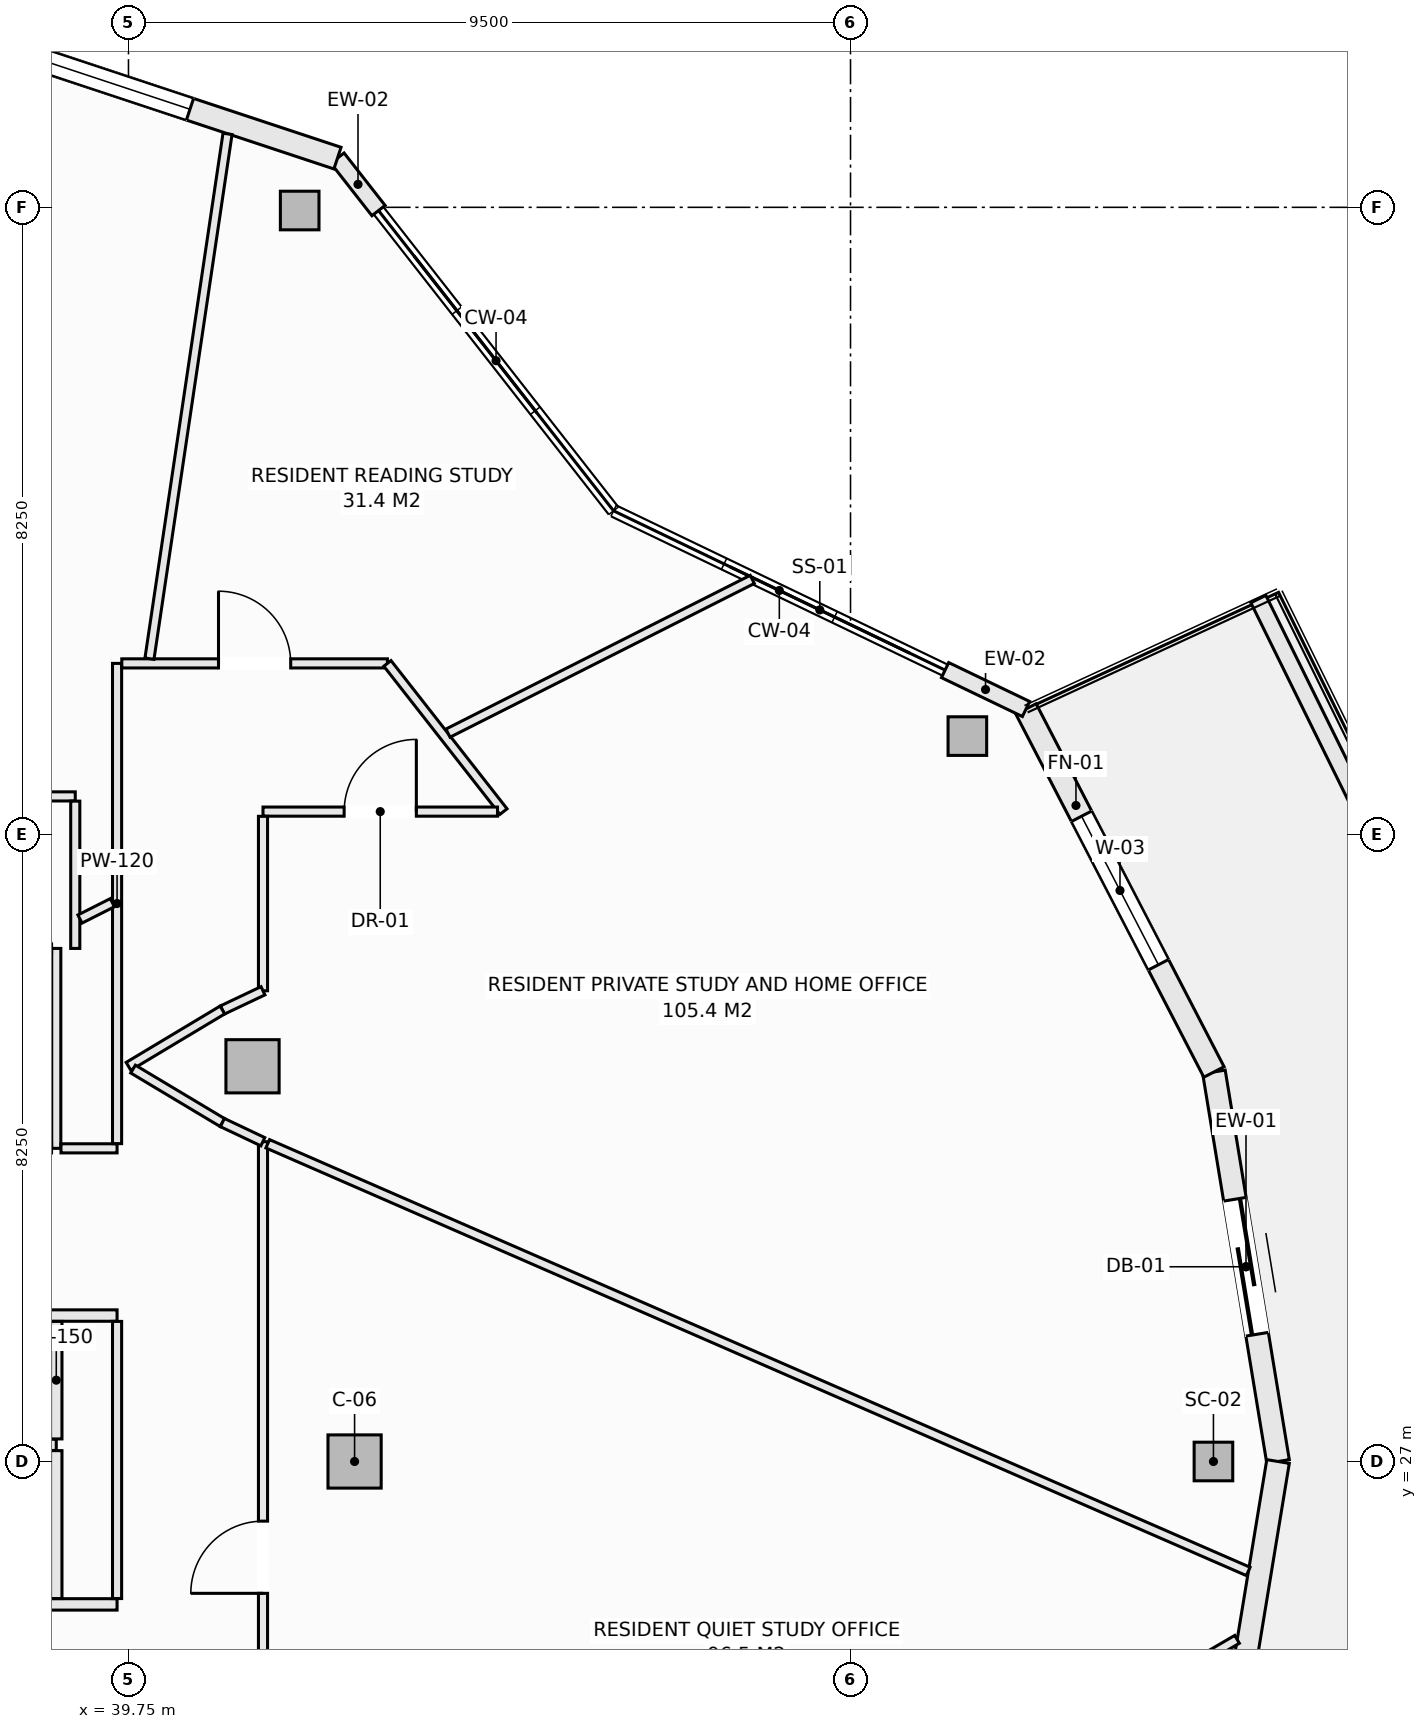
"""IFC4 building model, lengths in metres.
Left out: names, types, materials, properties, quantities, classifications, styles, units other than length and angle.
Written with IfcOpenShell. Run it as: python <this file> out.ifc"""

import sys

from ifc_helpers import new_model, si_unit, direction, frame, frame_2d, origin, origin_2d, place, context, subcontext, project, spatial, rectangle, hollow_rectangle, extrude, element, fill, save


model = new_model("IFC4")
c1 = context("Model", 3, precision=1e-05, world=origin(), true_north=direction((0.0, 1.0)))
c2 = subcontext(c1, "Body", "Model", "MODEL_VIEW")
j1 = project(units=[si_unit("LENGTHUNIT", "METRE"), si_unit("PLANEANGLEUNIT", "RADIAN")], contexts=[c1])
p1 = place(None, origin())
s1 = spatial("IfcSite", under=j1, at=p1, CompositionType="ELEMENT")
p2 = place(p1, origin())
s2 = spatial("IfcBuilding", under=s1, at=p2, CompositionType="ELEMENT")
p3 = place(p2, frame((0.0, 0.0, 232.7)))
s3 = spatial("IfcBuildingStorey", under=s2, at=p3, CompositionType="ELEMENT", Elevation=232.7)
for number, where, z_axis, x_axis in (
    (1, (54.025, 27.0, -0.27), (0.0, 0.0, 1.0), (1.0, 0.0, 0.0)),
    (2, (50.787, 36.544, -0.27), (0.0, 0.0, 1.0), (1.0, 0.0, 0.0)),
    (3, (42.003, 43.458, -0.27), (0.0, 0.0, 1.0), (1.0, 0.0, 0.0)),
):
    element("IfcColumn", number, at=place(p3, frame(where, z_axis=z_axis, x_axis=x_axis)), inside=s3, PredefinedType="COLUMN", context=c2, shape_type="SweptSolid", body=[
        extrude(hollow_rectangle(XDim=0.508, YDim=0.508, WallThickness=0.019, at=origin_2d()), origin(), (0.0, 0.0, 1.0), 3.3),
    ])
for number, where, z_axis, x_axis in (
    (4, (42.725, 27.0, -0.27), (0.0, 0.0, 1.0), (1.0, 0.0, 0.0)),
    (5, (41.382, 32.199, -0.27), (0.0, 0.0, 1.0), (1.0, 0.0, 0.0)),
):
    element("IfcColumn", number, at=place(p3, frame(where, z_axis=z_axis, x_axis=x_axis)), inside=s3, PredefinedType="COLUMN", context=c2, shape_type="SweptSolid", body=[
        extrude(rectangle(XDim=0.7, YDim=0.7, at=origin_2d()), origin(), (0.0, 0.0, 1.0), 3.3),
    ])
p4 = place(p3, frame((54.032, 32.125, 0.0), z_axis=(0.0, 0.0, 1.0), x_axis=(0.16237087798, -0.986729799886, 0.0)))
e6 = element("IfcWall", 6, at=p4, inside=s3, PredefinedType="SOLIDWALL", context=c2, shape_type="SweptSolid", body=[
    extrude(rectangle(XDim=5.193, YDim=0.3, at=frame_2d((2.597, 0.0))), origin(), (0.0, 0.0, 1.0), 2.605),
])
p5 = place(p4, frame((1.697, 0.0, 0.0)))
e7 = element("IfcOpeningElement", 7, at=p5, cuts=e6, PredefinedType="OPENING", context=c2, shape_type="SweptSolid", body=[
    extrude(rectangle(XDim=1.8, YDim=2.25, at=frame_2d((0.9, 1.125))), frame((0.0, 0.16, 0.0), z_axis=(0.0, -1.0, 0.0), x_axis=(1.0, 0.0, 0.0)), (0.0, 0.0, 1.0), 0.32),
])
p6 = place(p3, frame((51.559, 36.9, 0.0), z_axis=(0.0, 0.0, 1.0), x_axis=(0.459808219482, -0.888018243786, 0.0)))
e8 = element("IfcWall", 8, at=p6, inside=s3, PredefinedType="SOLIDWALL", context=c2, shape_type="SweptSolid", body=[
    extrude(rectangle(XDim=5.378, YDim=0.3, at=frame_2d((2.689, 0.0))), origin(), (0.0, 0.0, 1.0), 2.605),
])
p7 = place(p6, frame((1.589, 0.0, 0.72)))
e9 = element("IfcOpeningElement", 9, at=p7, cuts=e8, PredefinedType="OPENING", context=c2, shape_type="SweptSolid", body=[
    extrude(rectangle(XDim=2.2, YDim=1.65, at=frame_2d((1.1, 0.825))), frame((0.0, 0.16, 0.0), z_axis=(0.0, -1.0, 0.0), x_axis=(1.0, 0.0, 0.0)), (0.0, 0.0, 1.0), 0.32),
])
p8 = place(p3, frame((50.494, 37.412, 0.0), z_axis=(0.0, 0.0, 1.0), x_axis=(0.901342408365, -0.433107218692, 0.0)))
e10 = element("IfcWall", 10, at=p8, inside=s3, PredefinedType="SOLIDWALL", context=c2, shape_type="SweptSolid", body=[
    extrude(rectangle(XDim=1.181, YDim=0.22, at=frame_2d((0.591, 0.0))), origin(), (0.0, 0.0, 1.0), 2.605),
])
p9 = place(p3, frame((42.5, 44.147, 0.0), z_axis=(0.0, 0.0, 1.0), x_axis=(0.61650363284, -0.787352062736, 0.0)))
e11 = element("IfcWall", 11, at=p9, inside=s3, PredefinedType="SOLIDWALL", context=c2, shape_type="SweptSolid", body=[
    extrude(rectangle(XDim=0.876, YDim=0.22, at=frame_2d((0.438, 0.0))), origin(), (0.0, 0.0, 1.0), 2.605),
])
p10 = place(p3, frame((36.531, 46.125, 0.0), z_axis=(0.0, 0.0, 1.0), x_axis=(0.949240877604, -0.314550085495, 0.0)))
e12 = element("IfcWall", 12, at=p10, inside=s3, PredefinedType="SOLIDWALL", context=c2, shape_type="SweptSolid", body=[
    extrude(rectangle(XDim=6.288, YDim=0.3, at=frame_2d((3.144, 0.0))), origin(), (0.0, 0.0, 1.0), 2.605),
])
p11 = place(p10, frame((2.044, 0.0, 0.72)))
e13 = element("IfcOpeningElement", 13, at=p11, cuts=e12, PredefinedType="OPENING", context=c2, shape_type="SweptSolid", body=[
    extrude(rectangle(XDim=2.2, YDim=1.65, at=frame_2d((1.1, 0.825))), frame((0.0, 0.16, 0.0), z_axis=(0.0, -1.0, 0.0), x_axis=(1.0, 0.0, 0.0)), (0.0, 0.0, 1.0), 0.32),
])
p12 = place(p3, frame((54.032, 21.875, 0.0), z_axis=(0.0, 0.0, 1.0), x_axis=(0.16237087798, 0.986729799886, 0.0)))
e14 = element("IfcWall", 14, at=p12, inside=s3, PredefinedType="SOLIDWALL", context=c2, shape_type="SweptSolid", body=[
    extrude(rectangle(XDim=5.193, YDim=0.3, at=frame_2d((2.597, 0.0))), origin(), (0.0, 0.0, 1.0), 2.605),
])
p13 = place(p12, frame((1.18, 0.0, 0.72)))
e15 = element("IfcOpeningElement", 15, at=p13, cuts=e14, PredefinedType="OPENING", context=c2, shape_type="SweptSolid", body=[
    extrude(rectangle(XDim=1.2, YDim=1.65, at=frame_2d((0.6, 0.825))), frame((0.0, 0.16, 0.0), z_axis=(0.0, -1.0, 0.0), x_axis=(1.0, 0.0, 0.0)), (0.0, 0.0, 1.0), 0.32),
])
p14 = place(p3, frame((54.616, 38.347, 0.0), z_axis=(0.0, 0.0, 1.0), x_axis=(0.441640961804, -0.897191875162, 0.0)))
e16 = element("IfcWall", 16, at=p14, inside=s3, PredefinedType="PARAPET", context=c2, shape_type="SweptSolid", body=[
    extrude(rectangle(XDim=6.178, YDim=0.22, at=frame_2d((3.089, 0.0))), origin(), (0.0, 0.0, 1.0), 0.52),
])
p15 = place(p3, frame((30.077, 28.92, 0.0), z_axis=(0.0, 0.0, 1.0), x_axis=(1.0, 0.0, 0.0)))
e17 = element("IfcWall", 17, at=p15, inside=s3, PredefinedType="PARTITIONING", context=c2, shape_type="SweptSolid", body=[
    extrude(rectangle(XDim=9.523, YDim=0.15, at=frame_2d((4.762, 0.0))), origin(), (0.0, 0.0, 1.0), 3.03),
])
p16 = place(p15, frame((1.342, 0.0, 0.0)))
e18 = element("IfcOpeningElement", 18, at=p16, cuts=e17, PredefinedType="OPENING", context=c2, shape_type="SweptSolid", body=[
    extrude(rectangle(XDim=0.95, YDim=2.1, at=frame_2d((0.475, 1.05))), frame((0.0, 0.085, 0.0), z_axis=(0.0, -1.0, 0.0), x_axis=(1.0, 0.0, 0.0)), (0.0, 0.0, 1.0), 0.17),
])
p17 = place(p15, frame((5.498, 0.0, 0.0)))
e19 = element("IfcOpeningElement", 19, at=p17, cuts=e17, PredefinedType="OPENING", context=c2, shape_type="SweptSolid", body=[
    extrude(rectangle(XDim=0.95, YDim=2.1, at=frame_2d((0.475, 1.05))), frame((0.0, 0.085, 0.0), z_axis=(0.0, -1.0, 0.0), x_axis=(1.0, 0.0, 0.0)), (0.0, 0.0, 1.0), 0.17),
])
p18 = place(p3, frame((33.377, 25.12, 0.0), z_axis=(0.0, 0.0, 1.0), x_axis=(1.0, 0.0, 0.0)))
e20 = element("IfcWall", 20, at=p18, inside=s3, PredefinedType="PARTITIONING", context=c2, shape_type="SweptSolid", body=[
    extrude(rectangle(XDim=6.223, YDim=0.15, at=frame_2d((3.112, 0.0))), origin(), (0.0, 0.0, 1.0), 3.03),
])
p19 = place(p18, frame((2.441, 0.0, 0.0)))
e21 = element("IfcOpeningElement", 21, at=p19, cuts=e20, PredefinedType="OPENING", context=c2, shape_type="SweptSolid", body=[
    extrude(rectangle(XDim=0.95, YDim=2.1, at=frame_2d((0.475, 1.05))), frame((0.0, 0.085, 0.0), z_axis=(0.0, -1.0, 0.0), x_axis=(1.0, 0.0, 0.0)), (0.0, 0.0, 1.0), 0.17),
])
p20 = place(p3, frame((33.377, 27.22, 0.0), z_axis=(0.0, 0.0, 1.0), x_axis=(1.0, 0.0, 0.0)))
e22 = element("IfcWall", 22, at=p20, inside=s3, PredefinedType="PARTITIONING", context=c2, shape_type="SweptSolid", body=[
    extrude(rectangle(XDim=5.423, YDim=0.15, at=frame_2d((2.711, 0.0))), origin(), (0.0, 0.0, 1.0), 3.03),
])
p21 = place(p3, frame((38.8, 25.197, 0.0), z_axis=(0.0, 0.0, 1.0), x_axis=(0.0, 1.0, 0.0)))
e23 = element("IfcWall", 23, at=p21, inside=s3, PredefinedType="PARTITIONING", context=c2, shape_type="SweptSolid", body=[
    extrude(rectangle(XDim=1.946, YDim=0.15, at=frame_2d((0.973, 0.0))), origin(), (0.0, 0.0, 1.0), 3.03),
])
p22 = place(p3, frame((38.8, 27.297, 0.0), z_axis=(0.0, 0.0, 1.0), x_axis=(0.0, 1.0, 0.0)))
e24 = element("IfcWall", 24, at=p22, inside=s3, PredefinedType="PARTITIONING", context=c2, shape_type="SweptSolid", body=[
    extrude(rectangle(XDim=1.546, YDim=0.15, at=frame_2d((0.773, 0.0))), origin(), (0.0, 0.0, 1.0), 3.03),
])
p23 = place(p3, frame((38.8, 31.12, 0.0), z_axis=(0.0, 0.0, 1.0), x_axis=(0.0, 1.0, 0.0)))
e25 = element("IfcWall", 25, at=p23, inside=s3, PredefinedType="PARTITIONING", context=c2, shape_type="SweptSolid", body=[
    extrude(rectangle(XDim=2.63, YDim=0.12, at=frame_2d((1.315, 0.0))), origin(), (0.0, 0.0, 1.0), 3.03),
])
p24 = place(p3, frame((38.862, 31.12, 0.0), z_axis=(0.0, 0.0, 1.0), x_axis=(1.0, 0.0, 0.0)))
e26 = element("IfcWall", 26, at=p24, inside=s3, PredefinedType="PARTITIONING", context=c2, shape_type="SweptSolid", body=[
    extrude(rectangle(XDim=0.738, YDim=0.12, at=frame_2d((0.369, 0.0))), origin(), (0.0, 0.0, 1.0), 3.03),
])
p25 = place(p3, frame((34.025, 35.75, 0.0), z_axis=(0.0, 0.0, 1.0), x_axis=(1.0, 0.0, 0.0)))
e27 = element("IfcWall", 27, at=p25, inside=s3, PredefinedType="PARTITIONING", context=c2, shape_type="SweptSolid", body=[
    extrude(rectangle(XDim=5.025, YDim=0.12, at=frame_2d((2.513, 0.0))), origin(), (0.0, 0.0, 1.0), 2.478),
])
p26 = place(p25, frame((1.617, 0.0, 0.0)))
e28 = element("IfcOpeningElement", 28, at=p26, cuts=e27, PredefinedType="OPENING", context=c2, shape_type="SweptSolid", body=[
    extrude(rectangle(XDim=0.95, YDim=2.1, at=frame_2d((0.475, 1.05))), frame((0.0, 0.07, 0.0), z_axis=(0.0, -1.0, 0.0), x_axis=(1.0, 0.0, 0.0)), (0.0, 0.0, 1.0), 0.14),
])
p27 = place(p3, frame((39.05, 33.75, 0.0), z_axis=(0.0, 0.0, 1.0), x_axis=(0.0, 1.0, 0.0)))
e29 = element("IfcWall", 29, at=p27, inside=s3, PredefinedType="PARTITIONING", context=c2, shape_type="SweptSolid", body=[
    extrude(rectangle(XDim=1.938, YDim=0.12, at=frame_2d((0.969, 0.0))), origin(), (0.0, 0.0, 1.0), 3.03),
])
p28 = place(p3, frame((39.6, 25.197, 0.0), z_axis=(0.0, 0.0, 1.0), x_axis=(0.0, 1.0, 0.0)))
e30 = element("IfcWall", 30, at=p28, inside=s3, PredefinedType="PARTITIONING", context=c2, shape_type="SweptSolid", body=[
    extrude(rectangle(XDim=3.646, YDim=0.12, at=frame_2d((1.823, 0.0))), origin(), (0.0, 0.0, 1.0), 3.03),
])
p29 = place(p3, frame((39.6, 31.182, 0.0), z_axis=(0.0, 0.0, 1.0), x_axis=(0.0, 1.0, 0.0)))
e31 = element("IfcWall", 31, at=p29, inside=s3, PredefinedType="PARTITIONING", context=c2, shape_type="SweptSolid", body=[
    extrude(rectangle(XDim=6.318, YDim=0.12, at=frame_2d((3.159, 0.0))), origin(), (0.0, 0.0, 1.0), 3.03),
])
p30 = place(p3, frame((39.662, 37.5, 0.0), z_axis=(0.0, 0.0, 1.0), x_axis=(1.0, 0.0, 0.0)))
e32 = element("IfcWall", 32, at=p30, inside=s3, PredefinedType="PARTITIONING", context=c2, shape_type="SweptSolid", body=[
    extrude(rectangle(XDim=3.495, YDim=0.12, at=frame_2d((1.748, 0.0))), origin(), (0.0, 0.0, 1.0), 2.77),
])
p31 = place(p30, frame((1.272, 0.0, 0.0)))
e33 = element("IfcOpeningElement", 33, at=p31, cuts=e32, PredefinedType="OPENING", context=c2, shape_type="SweptSolid", body=[
    extrude(rectangle(XDim=0.95, YDim=2.1, at=frame_2d((0.475, 1.05))), frame((0.0, 0.07, 0.0), z_axis=(0.0, -1.0, 0.0), x_axis=(1.0, 0.0, 0.0)), (0.0, 0.0, 1.0), 0.14),
])
p32 = place(p3, frame((43.157, 37.5, 0.0), z_axis=(0.0, 0.0, 1.0), x_axis=(0.616571357052, -0.78729902938, 0.0)))
e34 = element("IfcWall", 34, at=p32, inside=s3, PredefinedType="PARTITIONING", context=c2, shape_type="SweptSolid", body=[
    extrude(rectangle(XDim=2.477, YDim=0.12, at=frame_2d((1.238, 0.0))), origin(), (0.0, 0.0, 1.0), 3.03),
])
p33 = place(p3, frame((41.52, 35.55, 0.0), z_axis=(0.0, 0.0, 1.0), x_axis=(1.0, 0.0, 0.0)))
e35 = element("IfcWall", 35, at=p33, inside=s3, PredefinedType="PARTITIONING", context=c2, shape_type="SweptSolid", body=[
    extrude(rectangle(XDim=3.085, YDim=0.12, at=frame_2d((1.542, 0.0))), origin(), (0.0, 0.0, 1.0), 3.03),
])
p34 = place(p33, frame((1.068, 0.0, 0.0)))
e36 = element("IfcOpeningElement", 36, at=p34, cuts=e35, PredefinedType="OPENING", context=c2, shape_type="SweptSolid", body=[
    extrude(rectangle(XDim=0.95, YDim=2.1, at=frame_2d((0.475, 1.05))), frame((0.0, 0.07, 0.0), z_axis=(0.0, -1.0, 0.0), x_axis=(1.0, 0.0, 0.0)), (0.0, 0.0, 1.0), 0.14),
])
p35 = place(p3, frame((41.52, 22.794, 0.0), z_axis=(0.0, 0.0, 1.0), x_axis=(0.0, 1.0, 0.0)))
e37 = element("IfcWall", 37, at=p35, inside=s3, PredefinedType="PARTITIONING", context=c2, shape_type="SweptSolid", body=[
    extrude(rectangle(XDim=8.413, YDim=0.12, at=frame_2d((4.207, 0.0))), origin(), (0.0, 0.0, 1.0), 2.478),
])
p36 = place(p35, frame((2.471, 0.0, 0.0)))
e38 = element("IfcOpeningElement", 38, at=p36, cuts=e37, PredefinedType="OPENING", context=c2, shape_type="SweptSolid", body=[
    extrude(rectangle(XDim=0.95, YDim=2.1, at=frame_2d((0.475, 1.05))), frame((0.0, 0.07, 0.0), z_axis=(0.0, -1.0, 0.0), x_axis=(1.0, 0.0, 0.0)), (0.0, 0.0, 1.0), 0.14),
])
p37 = place(p3, frame((41.52, 33.193, 0.0), z_axis=(0.0, 0.0, 1.0), x_axis=(0.0, 1.0, 0.0)))
e39 = element("IfcWall", 39, at=p37, inside=s3, PredefinedType="PARTITIONING", context=c2, shape_type="SweptSolid", body=[
    extrude(rectangle(XDim=2.295, YDim=0.12, at=frame_2d((1.147, 0.0))), origin(), (0.0, 0.0, 1.0), 3.03),
])
p38 = place(p3, frame((40.986, 32.94, 0.0), z_axis=(0.0, 0.0, 1.0), x_axis=(0.90356951601, 0.428441512621, 0.0)))
e40 = element("IfcWall", 40, at=p38, inside=s3, PredefinedType="PARTITIONING", context=c2, shape_type="SweptSolid", body=[
    extrude(rectangle(XDim=0.591, YDim=0.12, at=frame_2d((0.295, 0.0))), origin(), (0.0, 0.0, 1.0), 3.03),
])
p39 = place(p3, frame((39.75, 32.199, 0.0), z_axis=(0.0, 0.0, 1.0), x_axis=(0.857702120906, 0.514146935996, 0.0)))
e41 = element("IfcWall", 41, at=p39, inside=s3, PredefinedType="PARTITIONING", context=c2, shape_type="SweptSolid", body=[
    extrude(rectangle(XDim=1.441, YDim=0.12, at=frame_2d((0.721, 0.0))), origin(), (0.0, 0.0, 1.0), 3.03),
])
p40 = place(p3, frame((39.81, 32.163, 0.0), z_axis=(0.0, 0.0, 1.0), x_axis=(0.858011245414, -0.513630901273, 0.0)))
e42 = element("IfcWall", 42, at=p40, inside=s3, PredefinedType="PARTITIONING", context=c2, shape_type="SweptSolid", body=[
    extrude(rectangle(XDim=1.37, YDim=0.12, at=frame_2d((0.685, 0.0))), origin(), (0.0, 0.0, 1.0), 3.03),
])
p41 = place(p3, frame((40.986, 31.459, 0.0), z_axis=(0.0, 0.0, 1.0), x_axis=(0.903687141457, -0.428193356283, 0.0)))
e43 = element("IfcWall", 43, at=p41, inside=s3, PredefinedType="PARTITIONING", context=c2, shape_type="SweptSolid", body=[
    extrude(rectangle(XDim=0.588, YDim=0.12, at=frame_2d((0.294, 0.0))), origin(), (0.0, 0.0, 1.0), 3.03),
])
p42 = place(p3, frame((43.773, 18.512, 0.0), z_axis=(0.0, 0.0, 1.0), x_axis=(0.864261022419, 0.503043621495, 0.0)))
e44 = element("IfcWall", 44, at=p42, inside=s3, PredefinedType="PARTITIONING", context=c2, shape_type="SweptSolid", body=[
    extrude(rectangle(XDim=12.222, YDim=0.12, at=frame_2d((6.111, 0.0))), origin(), (0.0, 0.0, 1.0), 3.03),
])
p43 = place(p3, frame((41.582, 31.18, 0.0), z_axis=(0.0, 0.0, 1.0), x_axis=(0.916624100851, -0.399750244202, 0.0)))
e45 = element("IfcWall", 45, at=p43, inside=s3, PredefinedType="PARTITIONING", context=c2, shape_type="SweptSolid", body=[
    extrude(rectangle(XDim=14.074, YDim=0.12, at=frame_2d((7.037, 0.0))), origin(), (0.0, 0.0, 1.0), 2.478),
])
p44 = place(p3, frame((39.112, 34.137, 0.0), z_axis=(0.0, 0.0, 1.0), x_axis=(0.892681104984, 0.450688855869, 0.0)))
e46 = element("IfcWall", 46, at=p44, inside=s3, PredefinedType="PARTITIONING", context=c2, shape_type="SweptSolid", body=[
    extrude(rectangle(XDim=0.477, YDim=0.12, at=frame_2d((0.239, 0.0))), origin(), (0.0, 0.0, 1.0), 3.03),
])
p45 = place(p3, frame((43.954, 36.583, 0.0), z_axis=(0.0, 0.0, 1.0), x_axis=(0.892601830049, 0.450845841716, 0.0)))
e47 = element("IfcWall", 47, at=p45, inside=s3, PredefinedType="PARTITIONING", context=c2, shape_type="SweptSolid", body=[
    extrude(rectangle(XDim=4.485, YDim=0.12, at=frame_2d((2.243, 0.0))), origin(), (0.0, 0.0, 1.0), 3.03),
])
p46 = place(p3, frame((40.026, 37.562, 0.0), z_axis=(0.0, 0.0, 1.0), x_axis=(0.147138038827, 0.989115967685, 0.0)))
e48 = element("IfcWall", 48, at=p46, inside=s3, PredefinedType="PARTITIONING", context=c2, shape_type="SweptSolid", body=[
    extrude(rectangle(XDim=6.98, YDim=0.12, at=frame_2d((3.49, 0.0))), origin(), (0.0, 0.0, 1.0), 2.478),
])
p47 = place(p5, origin())
e49 = element("IfcDoor", 49, at=p47, inside=s3, OperationType="SLIDING_TO_LEFT", PredefinedType="DOOR", context=c2, shape_type="SweptSolid", body=[
    extrude(rectangle(XDim=1.8, YDim=2.25, at=frame_2d((0.9, 1.125))), frame((0.0, 0.025, 0.0), z_axis=(0.0, -1.0, 0.0), x_axis=(1.0, 0.0, 0.0)), (0.0, 0.0, 1.0), 0.05),
])
fill(e7, e49)
p48 = place(p7, origin())
e50 = element("IfcWindow", 50, at=p48, inside=s3, PartitioningType="SINGLE_PANEL", PredefinedType="WINDOW", context=c2, shape_type="SweptSolid", body=[
    extrude(rectangle(XDim=2.2, YDim=1.65, at=frame_2d((1.1, 0.825))), frame((0.0, 0.03, 0.0), z_axis=(0.0, -1.0, 0.0), x_axis=(1.0, 0.0, 0.0)), (0.0, 0.0, 1.0), 0.06),
])
fill(e9, e50)
p49 = place(p11, origin())
e51 = element("IfcWindow", 51, at=p49, inside=s3, PartitioningType="SINGLE_PANEL", PredefinedType="WINDOW", context=c2, shape_type="SweptSolid", body=[
    extrude(rectangle(XDim=2.2, YDim=1.65, at=frame_2d((1.1, 0.825))), frame((0.0, 0.03, 0.0), z_axis=(0.0, -1.0, 0.0), x_axis=(1.0, 0.0, 0.0)), (0.0, 0.0, 1.0), 0.06),
])
fill(e13, e51)
p50 = place(p36, origin())
e52 = element("IfcDoor", 52, at=p50, inside=s3, OperationType="SINGLE_SWING_LEFT", PredefinedType="DOOR", context=c2, shape_type="SweptSolid", body=[
    extrude(rectangle(XDim=0.95, YDim=2.1, at=frame_2d((0.475, 1.05))), frame((0.0, 0.025, 0.0), z_axis=(0.0, -1.0, 0.0), x_axis=(1.0, 0.0, 0.0)), (0.0, 0.0, 1.0), 0.05),
])
fill(e38, e52)
p51 = place(p34, origin())
e53 = element("IfcDoor", 53, at=p51, inside=s3, OperationType="SINGLE_SWING_RIGHT", PredefinedType="DOOR", context=c2, shape_type="SweptSolid", body=[
    extrude(rectangle(XDim=0.95, YDim=2.1, at=frame_2d((0.475, 1.05))), frame((0.0, 0.025, 0.0), z_axis=(0.0, -1.0, 0.0), x_axis=(1.0, 0.0, 0.0)), (0.0, 0.0, 1.0), 0.05),
])
fill(e36, e53)
p52 = place(p31, origin())
e54 = element("IfcDoor", 54, at=p52, inside=s3, OperationType="SINGLE_SWING_LEFT", PredefinedType="DOOR", context=c2, shape_type="SweptSolid", body=[
    extrude(rectangle(XDim=0.95, YDim=2.1, at=frame_2d((0.475, 1.05))), frame((0.0, 0.025, 0.0), z_axis=(0.0, -1.0, 0.0), x_axis=(1.0, 0.0, 0.0)), (0.0, 0.0, 1.0), 0.05),
])
fill(e33, e54)
save(model, sys.argv[1])
